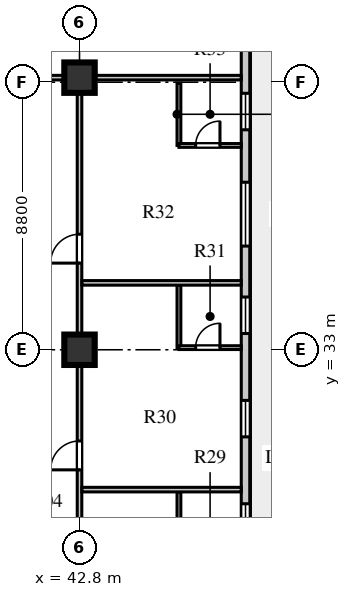
"""IFC4 building model, lengths in metres.
Left out: names, types, materials, properties, quantities, classifications, styles, units other than length and angle.
Written with IfcOpenShell. Run it as: python <this file> out.ifc"""

import sys

from ifc_helpers import new_model, si_unit, direction, frame, frame_2d, origin, origin_2d, place, context, subcontext, project, spatial, rectangle, extrude, element, fill, save


model = new_model("IFC4")
c1 = context("Model", 3, precision=1e-05, world=origin(), true_north=direction((0.0, 1.0)))
c2 = subcontext(c1, "Body", "Model", "MODEL_VIEW")
j1 = project(units=[si_unit("LENGTHUNIT", "METRE"), si_unit("PLANEANGLEUNIT", "RADIAN")], contexts=[c1])
p1 = place(None, origin())
s1 = spatial("IfcSite", under=j1, at=p1, CompositionType="ELEMENT")
p2 = place(p1, origin())
s2 = spatial("IfcBuilding", under=s1, at=p2, CompositionType="ELEMENT")
p3 = place(p2, frame((0.0, 0.0, 134.8)))
s3 = spatial("IfcBuildingStorey", under=s2, at=p3, CompositionType="ELEMENT", Elevation=134.8)
for number, where, z_axis, x_axis in (
    (1, (42.8, 33.0, 0.0), (0.0, 0.0, 1.0), (1.0, 0.0, 0.0)),
    (2, (42.8, 41.95, 0.0), (0.0, 0.0, 1.0), (1.0, 0.0, 0.0)),
):
    element("IfcColumn", number, at=place(p3, frame(where, z_axis=z_axis, x_axis=x_axis)), inside=s3, PredefinedType="COLUMN", context=c2, shape_type="SweptSolid", body=[
        extrude(rectangle(XDim=1.0, YDim=1.0, at=origin_2d()), origin(), (0.0, 0.0, 1.0), 3.6),
    ])
p4 = place(p3, frame((48.26, 13.33, 0.0), z_axis=(0.0, 0.0, 1.0), x_axis=(0.0, 1.0, 0.0)))
e3 = element("IfcWall", 3, at=p4, inside=s3, PredefinedType="STANDARD", context=c2, shape_type="SweptSolid", body=[
    extrude(rectangle(XDim=30.54, YDim=0.28, at=frame_2d((15.27, 0.0))), origin(), (0.0, 0.0, 1.0), 3.6),
])
p5 = place(p4, frame((2.41, 0.0, 0.0)))
e4 = element("IfcOpeningElement", 4, at=p5, cuts=e3, PredefinedType="OPENING", context=c2, shape_type="SweptSolid", body=[
    extrude(rectangle(XDim=1.0, YDim=2.05, at=frame_2d((0.5, 1.025))), frame((0.0, 0.15, 0.0), z_axis=(0.0, -1.0, 0.0), x_axis=(1.0, 0.0, 0.0)), (0.0, 0.0, 1.0), 0.3),
])
p6 = place(p4, frame((4.205, 0.0, 0.8)))
e5 = element("IfcOpeningElement", 5, at=p6, cuts=e3, PredefinedType="OPENING", context=c2, shape_type="SweptSolid", body=[
    extrude(rectangle(XDim=1.2, YDim=1.75, at=frame_2d((0.6, 0.875))), frame((0.0, 0.15, 0.0), z_axis=(0.0, -1.0, 0.0), x_axis=(1.0, 0.0, 0.0)), (0.0, 0.0, 1.0), 0.3),
])
p7 = place(p4, frame((6.605, 0.0, 0.8)))
e6 = element("IfcOpeningElement", 6, at=p7, cuts=e3, PredefinedType="OPENING", context=c2, shape_type="SweptSolid", body=[
    extrude(rectangle(XDim=1.2, YDim=1.75, at=frame_2d((0.6, 0.875))), frame((0.0, 0.15, 0.0), z_axis=(0.0, -1.0, 0.0), x_axis=(1.0, 0.0, 0.0)), (0.0, 0.0, 1.0), 0.3),
])
p8 = place(p4, frame((9.705, 0.0, 0.8)))
e7 = element("IfcOpeningElement", 7, at=p8, cuts=e3, PredefinedType="OPENING", context=c2, shape_type="SweptSolid", body=[
    extrude(rectangle(XDim=1.8, YDim=2.0, at=frame_2d((0.9, 1.0))), frame((0.0, 0.15, 0.0), z_axis=(0.0, -1.0, 0.0), x_axis=(1.0, 0.0, 0.0)), (0.0, 0.0, 1.0), 0.3),
])
p9 = place(p4, frame((13.405, 0.0, 0.8)))
e8 = element("IfcOpeningElement", 8, at=p9, cuts=e3, PredefinedType="OPENING", context=c2, shape_type="SweptSolid", body=[
    extrude(rectangle(XDim=1.2, YDim=1.75, at=frame_2d((0.6, 0.875))), frame((0.0, 0.15, 0.0), z_axis=(0.0, -1.0, 0.0), x_axis=(1.0, 0.0, 0.0)), (0.0, 0.0, 1.0), 0.3),
])
p10 = place(p4, frame((16.805, 0.0, 0.8)))
e9 = element("IfcOpeningElement", 9, at=p10, cuts=e3, PredefinedType="OPENING", context=c2, shape_type="SweptSolid", body=[
    extrude(rectangle(XDim=1.2, YDim=1.75, at=frame_2d((0.6, 0.875))), frame((0.0, 0.15, 0.0), z_axis=(0.0, -1.0, 0.0), x_axis=(1.0, 0.0, 0.0)), (0.0, 0.0, 1.0), 0.3),
])
p11 = place(p4, frame((20.205, 0.0, 0.8)))
e10 = element("IfcOpeningElement", 10, at=p11, cuts=e3, PredefinedType="OPENING", context=c2, shape_type="SweptSolid", body=[
    extrude(rectangle(XDim=1.2, YDim=1.75, at=frame_2d((0.6, 0.875))), frame((0.0, 0.15, 0.0), z_axis=(0.0, -1.0, 0.0), x_axis=(1.0, 0.0, 0.0)), (0.0, 0.0, 1.0), 0.3),
])
p12 = place(p4, frame((23.08, 0.0, 0.8)))
e11 = element("IfcOpeningElement", 11, at=p12, cuts=e3, PredefinedType="OPENING", context=c2, shape_type="SweptSolid", body=[
    extrude(rectangle(XDim=2.1, YDim=1.95, at=frame_2d((1.05, 0.975))), frame((0.0, 0.15, 0.0), z_axis=(0.0, -1.0, 0.0), x_axis=(1.0, 0.0, 0.0)), (0.0, 0.0, 1.0), 0.3),
])
p13 = place(p4, frame((26.905, 0.0, 0.8)))
e12 = element("IfcOpeningElement", 12, at=p13, cuts=e3, PredefinedType="OPENING", context=c2, shape_type="SweptSolid", body=[
    extrude(rectangle(XDim=1.2, YDim=1.75, at=frame_2d((0.6, 0.875))), frame((0.0, 0.15, 0.0), z_axis=(0.0, -1.0, 0.0), x_axis=(1.0, 0.0, 0.0)), (0.0, 0.0, 1.0), 0.3),
])
p14 = place(p3, frame((42.8, 15.25, 0.0), z_axis=(0.0, 0.0, 1.0), x_axis=(0.0, 1.0, 0.0)))
e13 = element("IfcWall", 13, at=p14, inside=s3, PredefinedType="PARTITIONING", context=c2, shape_type="SweptSolid", body=[
    extrude(rectangle(XDim=26.7, YDim=0.15, at=frame_2d((13.35, 0.0))), origin(), (0.0, 0.0, 1.0), 2.95),
])
p15 = place(p14, frame((0.75, 0.0, 0.0)))
e14 = element("IfcOpeningElement", 14, at=p15, cuts=e13, PredefinedType="OPENING", context=c2, shape_type="SweptSolid", body=[
    extrude(rectangle(XDim=0.95, YDim=2.1, at=frame_2d((0.475, 1.05))), frame((0.0, 0.085, 0.0), z_axis=(0.0, -1.0, 0.0), x_axis=(1.0, 0.0, 0.0)), (0.0, 0.0, 1.0), 0.17),
])
p16 = place(p14, frame((7.0, 0.0, 0.0)))
e15 = element("IfcOpeningElement", 15, at=p16, cuts=e13, PredefinedType="OPENING", context=c2, shape_type="SweptSolid", body=[
    extrude(rectangle(XDim=0.95, YDim=2.1, at=frame_2d((0.475, 1.05))), frame((0.0, 0.085, 0.0), z_axis=(0.0, -1.0, 0.0), x_axis=(1.0, 0.0, 0.0)), (0.0, 0.0, 1.0), 0.17),
])
p17 = place(p14, frame((13.8, 0.0, 0.0)))
e16 = element("IfcOpeningElement", 16, at=p17, cuts=e13, PredefinedType="OPENING", context=c2, shape_type="SweptSolid", body=[
    extrude(rectangle(XDim=0.95, YDim=2.1, at=frame_2d((0.475, 1.05))), frame((0.0, 0.085, 0.0), z_axis=(0.0, -1.0, 0.0), x_axis=(1.0, 0.0, 0.0)), (0.0, 0.0, 1.0), 0.17),
])
p18 = place(p14, frame((20.6, 0.0, 0.0)))
e17 = element("IfcOpeningElement", 17, at=p18, cuts=e13, PredefinedType="OPENING", context=c2, shape_type="SweptSolid", body=[
    extrude(rectangle(XDim=0.95, YDim=2.1, at=frame_2d((0.475, 1.05))), frame((0.0, 0.085, 0.0), z_axis=(0.0, -1.0, 0.0), x_axis=(1.0, 0.0, 0.0)), (0.0, 0.0, 1.0), 0.17),
])
p19 = place(p3, frame((40.82, 41.95, 0.0), z_axis=(0.0, 0.0, 1.0), x_axis=(1.0, 0.0, 0.0)))
e18 = element("IfcWall", 18, at=p19, inside=s3, PredefinedType="PARTITIONING", context=c2, shape_type="SweptSolid", body=[
    extrude(rectangle(XDim=7.3, YDim=0.15, at=frame_2d((3.65, 0.0))), origin(), (0.0, 0.0, 1.0), 2.95),
])
p20 = place(p3, frame((46.07, 26.27, 0.0), z_axis=(0.0, 0.0, 1.0), x_axis=(0.0, 1.0, 0.0)))
e19 = element("IfcWall", 19, at=p20, inside=s3, PredefinedType="PLUMBINGWALL", context=c2, shape_type="SweptSolid", body=[
    extrude(rectangle(XDim=2.05, YDim=0.125, at=frame_2d((1.025, 0.0))), origin(), (0.0, 0.0, 1.0), 3.6),
])
p21 = place(p3, frame((42.88, 28.4, 0.0), z_axis=(0.0, 0.0, 1.0), x_axis=(1.0, 0.0, 0.0)))
e20 = element("IfcWall", 20, at=p21, inside=s3, PredefinedType="PARTITIONING", context=c2, shape_type="SweptSolid", body=[
    extrude(rectangle(XDim=5.24, YDim=0.15, at=frame_2d((2.62, 0.0))), origin(), (0.0, 0.0, 1.0), 3.6),
])
p22 = place(p3, frame((46.07, 33.07, 0.0), z_axis=(0.0, 0.0, 1.0), x_axis=(0.0, 1.0, 0.0)))
e21 = element("IfcWall", 21, at=p22, inside=s3, PredefinedType="PLUMBINGWALL", context=c2, shape_type="SweptSolid", body=[
    extrude(rectangle(XDim=2.05, YDim=0.125, at=frame_2d((1.025, 0.0))), origin(), (0.0, 0.0, 1.0), 3.6),
])
p23 = place(p3, frame((46.07, 33.07, 0.0), z_axis=(0.0, 0.0, 1.0), x_axis=(1.0, 0.0, 0.0)))
e22 = element("IfcWall", 22, at=p23, inside=s3, PredefinedType="PLUMBINGWALL", context=c2, shape_type="SweptSolid", body=[
    extrude(rectangle(XDim=2.05, YDim=0.125, at=frame_2d((1.025, 0.0))), origin(), (0.0, 0.0, 1.0), 3.1),
])
p24 = place(p23, frame((0.55, 0.0, 0.0)))
e23 = element("IfcOpeningElement", 23, at=p24, cuts=e22, PredefinedType="OPENING", context=c2, shape_type="SweptSolid", body=[
    extrude(rectangle(XDim=0.8, YDim=2.05, at=frame_2d((0.4, 1.025))), frame((0.0, 0.073, 0.0), z_axis=(0.0, -1.0, 0.0), x_axis=(1.0, 0.0, 0.0)), (0.0, 0.0, 1.0), 0.145),
])
p25 = place(p3, frame((42.88, 35.2, 0.0), z_axis=(0.0, 0.0, 1.0), x_axis=(1.0, 0.0, 0.0)))
e24 = element("IfcWall", 24, at=p25, inside=s3, PredefinedType="PARTITIONING", context=c2, shape_type="SweptSolid", body=[
    extrude(rectangle(XDim=5.24, YDim=0.15, at=frame_2d((2.62, 0.0))), origin(), (0.0, 0.0, 1.0), 3.6),
])
p26 = place(p3, frame((46.07, 39.72, 0.0), z_axis=(0.0, 0.0, 1.0), x_axis=(0.0, 1.0, 0.0)))
e25 = element("IfcWall", 25, at=p26, inside=s3, PredefinedType="PLUMBINGWALL", context=c2, shape_type="SweptSolid", body=[
    extrude(rectangle(XDim=2.05, YDim=0.125, at=frame_2d((1.025, 0.0))), origin(), (0.0, 0.0, 1.0), 3.6),
])
p27 = place(p3, frame((46.07, 39.72, 0.0), z_axis=(0.0, 0.0, 1.0), x_axis=(1.0, 0.0, 0.0)))
e26 = element("IfcWall", 26, at=p27, inside=s3, PredefinedType="PLUMBINGWALL", context=c2, shape_type="SweptSolid", body=[
    extrude(rectangle(XDim=2.05, YDim=0.125, at=frame_2d((1.025, 0.0))), origin(), (0.0, 0.0, 1.0), 3.6),
])
p28 = place(p27, frame((0.55, 0.0, 0.0)))
e27 = element("IfcOpeningElement", 27, at=p28, cuts=e26, PredefinedType="OPENING", context=c2, shape_type="SweptSolid", body=[
    extrude(rectangle(XDim=0.8, YDim=2.05, at=frame_2d((0.4, 1.025))), frame((0.0, 0.073, 0.0), z_axis=(0.0, -1.0, 0.0), x_axis=(1.0, 0.0, 0.0)), (0.0, 0.0, 1.0), 0.145),
])
p29 = place(p9, origin())
e28 = element("IfcWindow", 28, at=p29, inside=s3, PartitioningType="SINGLE_PANEL", PredefinedType="WINDOW", context=c2, shape_type="SweptSolid", body=[
    extrude(rectangle(XDim=1.2, YDim=1.75, at=frame_2d((0.6, 0.875))), frame((0.0, 0.03, 0.0), z_axis=(0.0, -1.0, 0.0), x_axis=(1.0, 0.0, 0.0)), (0.0, 0.0, 1.0), 0.06),
])
fill(e8, e28)
p30 = place(p10, origin())
e29 = element("IfcWindow", 29, at=p30, inside=s3, PartitioningType="SINGLE_PANEL", PredefinedType="WINDOW", context=c2, shape_type="SweptSolid", body=[
    extrude(rectangle(XDim=1.2, YDim=1.75, at=frame_2d((0.6, 0.875))), frame((0.0, 0.03, 0.0), z_axis=(0.0, -1.0, 0.0), x_axis=(1.0, 0.0, 0.0)), (0.0, 0.0, 1.0), 0.06),
])
fill(e9, e29)
p31 = place(p11, origin())
e30 = element("IfcWindow", 30, at=p31, inside=s3, PartitioningType="SINGLE_PANEL", PredefinedType="WINDOW", context=c2, shape_type="SweptSolid", body=[
    extrude(rectangle(XDim=1.2, YDim=1.75, at=frame_2d((0.6, 0.875))), frame((0.0, 0.03, 0.0), z_axis=(0.0, -1.0, 0.0), x_axis=(1.0, 0.0, 0.0)), (0.0, 0.0, 1.0), 0.06),
])
fill(e10, e30)
p32 = place(p12, origin())
e31 = element("IfcWindow", 31, at=p32, inside=s3, PartitioningType="SINGLE_PANEL", PredefinedType="WINDOW", context=c2, shape_type="SweptSolid", body=[
    extrude(rectangle(XDim=2.1, YDim=1.95, at=frame_2d((1.05, 0.975))), frame((0.0, 0.03, 0.0), z_axis=(0.0, -1.0, 0.0), x_axis=(1.0, 0.0, 0.0)), (0.0, 0.0, 1.0), 0.06),
])
fill(e11, e31)
p33 = place(p13, origin())
e32 = element("IfcWindow", 32, at=p33, inside=s3, PartitioningType="SINGLE_PANEL", PredefinedType="WINDOW", context=c2, shape_type="SweptSolid", body=[
    extrude(rectangle(XDim=1.2, YDim=1.75, at=frame_2d((0.6, 0.875))), frame((0.0, 0.03, 0.0), z_axis=(0.0, -1.0, 0.0), x_axis=(1.0, 0.0, 0.0)), (0.0, 0.0, 1.0), 0.06),
])
fill(e12, e32)
p34 = place(p17, origin())
e33 = element("IfcDoor", 33, at=p34, inside=s3, OperationType="SINGLE_SWING_LEFT", PredefinedType="DOOR", context=c2, shape_type="SweptSolid", body=[
    extrude(rectangle(XDim=0.95, YDim=2.1, at=frame_2d((0.475, 1.05))), frame((0.0, 0.025, 0.0), z_axis=(0.0, -1.0, 0.0), x_axis=(1.0, 0.0, 0.0)), (0.0, 0.0, 1.0), 0.05),
])
fill(e16, e33)
p35 = place(p24, frame((0.8, 0.0, 0.0), z_axis=(0.0, 0.0, 1.0), x_axis=(-1.0, 0.0, 0.0)))
e34 = element("IfcDoor", 34, at=p35, inside=s3, OperationType="SINGLE_SWING_LEFT", PredefinedType="DOOR", context=c2, shape_type="SweptSolid", body=[
    extrude(rectangle(XDim=0.8, YDim=2.05, at=frame_2d((0.4, 1.025))), frame((0.0, 0.025, 0.0), z_axis=(0.0, -1.0, 0.0), x_axis=(1.0, 0.0, 0.0)), (0.0, 0.0, 1.0), 0.05),
])
fill(e23, e34)
p36 = place(p18, origin())
e35 = element("IfcDoor", 35, at=p36, inside=s3, OperationType="SINGLE_SWING_LEFT", PredefinedType="DOOR", context=c2, shape_type="SweptSolid", body=[
    extrude(rectangle(XDim=0.95, YDim=2.1, at=frame_2d((0.475, 1.05))), frame((0.0, 0.025, 0.0), z_axis=(0.0, -1.0, 0.0), x_axis=(1.0, 0.0, 0.0)), (0.0, 0.0, 1.0), 0.05),
])
fill(e17, e35)
p37 = place(p28, frame((0.8, 0.0, 0.0), z_axis=(0.0, 0.0, 1.0), x_axis=(-1.0, 0.0, 0.0)))
e36 = element("IfcDoor", 36, at=p37, inside=s3, OperationType="SINGLE_SWING_LEFT", PredefinedType="DOOR", context=c2, shape_type="SweptSolid", body=[
    extrude(rectangle(XDim=0.8, YDim=2.05, at=frame_2d((0.4, 1.025))), frame((0.0, 0.025, 0.0), z_axis=(0.0, -1.0, 0.0), x_axis=(1.0, 0.0, 0.0)), (0.0, 0.0, 1.0), 0.05),
])
fill(e27, e36)
save(model, sys.argv[1])
